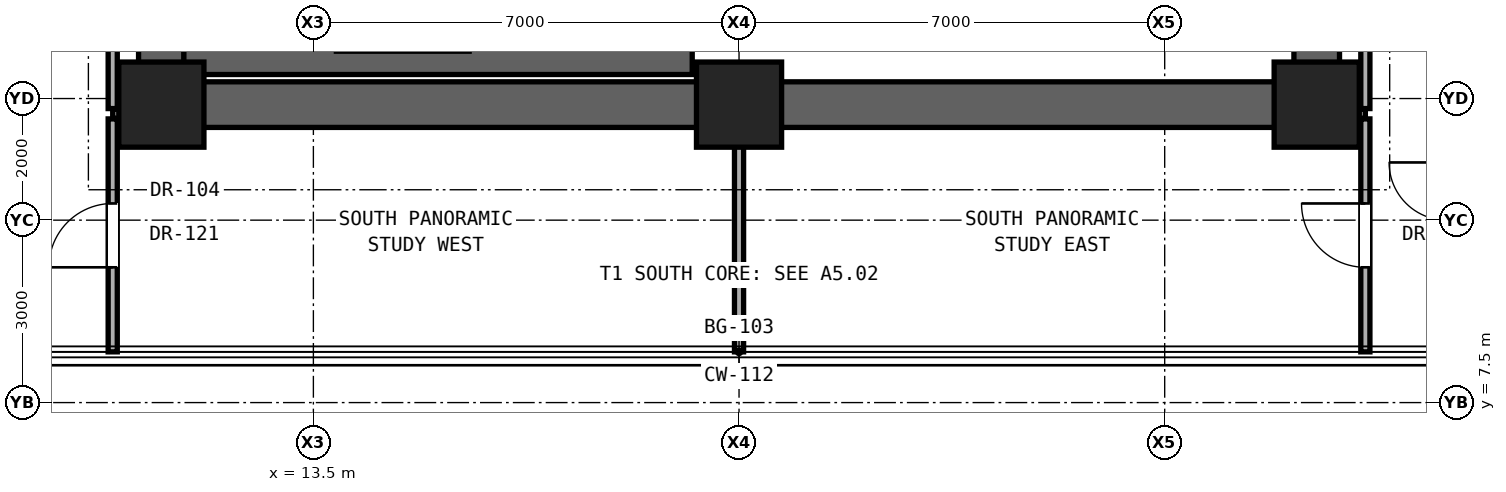
"""IFC4 building model, lengths in metres.
Left out: names, types, materials, properties, quantities, classifications, styles, units other than length and angle.
Written with IfcOpenShell. Run it as: python <this file> out.ifc"""

import sys

from ifc_helpers import new_model, si_unit, direction, frame, frame_2d, origin, origin_2d, place, context, subcontext, project, spatial, rectangle, extrude, element, fill, save


model = new_model("IFC4")
c1 = context("Model", 3, precision=1e-05, world=origin(), true_north=direction((0.0, 1.0)))
c2 = subcontext(c1, "Body", "Model", "MODEL_VIEW")
j1 = project(units=[si_unit("LENGTHUNIT", "METRE"), si_unit("PLANEANGLEUNIT", "RADIAN")], contexts=[c1])
p1 = place(None, origin())
s1 = spatial("IfcSite", under=j1, at=p1, CompositionType="ELEMENT")
p2 = place(p1, origin())
s2 = spatial("IfcBuilding", under=s1, at=p2, CompositionType="ELEMENT")
p3 = place(p2, frame((0.0, 0.0, 45.5)))
s3 = spatial("IfcBuildingStorey", under=s2, at=p3, CompositionType="ELEMENT", Elevation=45.5)
for number, where, z_axis, x_axis in (
    (1, (11.0, 12.4, 0.0), (0.0, 0.0, 1.0), (1.0, 0.0, 0.0)),
    (2, (20.5, 12.4, 0.0), (0.0, 0.0, 1.0), (1.0, 0.0, 0.0)),
    (3, (30.0, 12.4, 0.0), (0.0, 0.0, 1.0), (1.0, 0.0, 0.0)),
):
    element("IfcColumn", number, at=place(p3, frame(where, z_axis=z_axis, x_axis=x_axis)), inside=s3, PredefinedType="COLUMN", context=c2, shape_type="SweptSolid", body=[
        extrude(rectangle(XDim=1.4, YDim=1.4, at=origin_2d()), origin(), (0.0, 0.0, 1.0), 3.3),
    ])
p4 = place(p3, frame((11.0, 12.4, 0.0), z_axis=(0.0, 0.0, 1.0), x_axis=(1.0, 0.0, 0.0)))
e4 = element("IfcWall", 4, at=p4, inside=s3, PredefinedType="SHEAR", context=c2, shape_type="SweptSolid", body=[
    extrude(rectangle(XDim=19.0, YDim=0.75, at=frame_2d((9.5, 0.0))), origin(), (0.0, 0.0, 1.0), 3.06),
])
for number, where, z_axis, x_axis in (
    (5, (11.0, 12.4, 0.0), (0.0, 0.0, 1.0), (0.0, 1.0, 0.0)),
    (6, (30.0, 12.4, 0.0), (0.0, 0.0, 1.0), (0.0, 1.0, 0.0)),
):
    element("IfcWall", number, at=place(p3, frame(where, z_axis=z_axis, x_axis=x_axis)), inside=s3, PredefinedType="SHEAR", context=c2, shape_type="SweptSolid", body=[
        extrude(rectangle(XDim=6.0, YDim=0.75, at=frame_2d((3.0, 0.0))), origin(), (0.0, 0.0, 1.0), 3.06),
    ])
for number, where, z_axis, x_axis in (
    (7, (10.2, 12.25, 0.0), (0.0, 0.0, 1.0), (1.0, 0.0, 0.0)),
    (8, (30.37, 12.25, 0.0), (0.0, 0.0, 1.0), (1.0, 0.0, 0.0)),
):
    element("IfcWall", number, at=place(p3, frame(where, z_axis=z_axis, x_axis=x_axis)), inside=s3, PredefinedType="PARTITIONING", context=c2, shape_type="SweptSolid", body=[
        extrude(rectangle(XDim=0.43, YDim=0.15, at=frame_2d((0.215, 0.0))), origin(), (0.0, 0.0, 1.0), 3.06),
    ])
p5 = place(p3, frame((11.37, 13.12, 0.0), z_axis=(0.0, 0.0, 1.0), x_axis=(1.0, 0.0, 0.0)))
e9 = element("IfcWall", 9, at=p5, inside=s3, PredefinedType="SHEAR", context=c2, shape_type="SweptSolid", body=[
    extrude(rectangle(XDim=8.36, YDim=0.45, at=frame_2d((4.18, 0.0))), origin(), (0.0, 0.0, 1.0), 3.06),
])
p6 = place(p3, frame((10.2, 8.334, 0.0), z_axis=(0.0, 0.0, 1.0), x_axis=(0.0, 1.0, 0.0)))
e10 = element("IfcWall", 10, at=p6, inside=s3, PredefinedType="PARTITIONING", context=c2, shape_type="SweptSolid", body=[
    extrude(rectangle(XDim=3.831, YDim=0.15, at=frame_2d((1.916, 0.0))), origin(), (0.0, 0.0, 1.0), 3.06),
])
p7 = place(p6, frame((1.39, 0.0, 0.0)))
e11 = element("IfcOpeningElement", 11, at=p7, cuts=e10, PredefinedType="OPENING", context=c2, shape_type="SweptSolid", body=[
    extrude(rectangle(XDim=1.05, YDim=2.2, at=frame_2d((0.525, 1.1))), frame((0.0, 0.085, 0.0), z_axis=(0.0, -1.0, 0.0), x_axis=(1.0, 0.0, 0.0)), (0.0, 0.0, 1.0), 0.17),
])
p8 = place(p3, frame((10.2, 12.335, 0.0), z_axis=(0.0, 0.0, 1.0), x_axis=(0.0, 1.0, 0.0)))
e12 = element("IfcWall", 12, at=p8, inside=s3, PredefinedType="PARTITIONING", context=c2, shape_type="SweptSolid", body=[
    extrude(rectangle(XDim=5.98, YDim=0.15, at=frame_2d((2.99, 0.0))), origin(), (0.0, 0.0, 1.0), 2.436),
])
p9 = place(p3, frame((20.5, 8.334, 0.0), z_axis=(0.0, 0.0, 1.0), x_axis=(0.0, 1.0, 0.0)))
e13 = element("IfcWall", 13, at=p9, inside=s3, PredefinedType="PARTITIONING", context=c2, shape_type="SweptSolid", body=[
    extrude(rectangle(XDim=3.696, YDim=0.15, at=frame_2d((1.848, 0.0))), origin(), (0.0, 0.0, 1.0), 3.06),
])
p10 = place(p3, frame((30.8, 8.334, 0.0), z_axis=(0.0, 0.0, 1.0), x_axis=(0.0, 1.0, 0.0)))
e14 = element("IfcWall", 14, at=p10, inside=s3, PredefinedType="PARTITIONING", context=c2, shape_type="SweptSolid", body=[
    extrude(rectangle(XDim=3.831, YDim=0.15, at=frame_2d((1.916, 0.0))), origin(), (0.0, 0.0, 1.0), 3.06),
])
p11 = place(p10, frame((1.39, 0.0, 0.0)))
e15 = element("IfcOpeningElement", 15, at=p11, cuts=e14, PredefinedType="OPENING", context=c2, shape_type="SweptSolid", body=[
    extrude(rectangle(XDim=1.05, YDim=2.2, at=frame_2d((0.525, 1.1))), frame((0.0, 0.085, 0.0), z_axis=(0.0, -1.0, 0.0), x_axis=(1.0, 0.0, 0.0)), (0.0, 0.0, 1.0), 0.17),
])
p12 = place(p3, frame((30.8, 12.335, 0.0), z_axis=(0.0, 0.0, 1.0), x_axis=(0.0, 1.0, 0.0)))
e16 = element("IfcWall", 16, at=p12, inside=s3, PredefinedType="PARTITIONING", context=c2, shape_type="SweptSolid", body=[
    extrude(rectangle(XDim=5.98, YDim=0.15, at=frame_2d((2.99, 0.0))), origin(), (0.0, 0.0, 1.0), 2.436),
])
p13 = place(p7, origin())
e17 = element("IfcDoor", 17, at=p13, inside=s3, OperationType="SINGLE_SWING_LEFT", PredefinedType="DOOR", context=c2, shape_type="SweptSolid", body=[
    extrude(rectangle(XDim=1.05, YDim=2.2, at=frame_2d((0.525, 1.1))), frame((0.0, 0.025, 0.0), z_axis=(0.0, -1.0, 0.0), x_axis=(1.0, 0.0, 0.0)), (0.0, 0.0, 1.0), 0.05),
])
fill(e11, e17)
p14 = place(p11, origin())
e18 = element("IfcDoor", 18, at=p14, inside=s3, OperationType="SINGLE_SWING_RIGHT", PredefinedType="DOOR", context=c2, shape_type="SweptSolid", body=[
    extrude(rectangle(XDim=1.05, YDim=2.2, at=frame_2d((0.525, 1.1))), frame((0.0, 0.025, 0.0), z_axis=(0.0, -1.0, 0.0), x_axis=(1.0, 0.0, 0.0)), (0.0, 0.0, 1.0), 0.05),
])
fill(e15, e18)
save(model, sys.argv[1])
